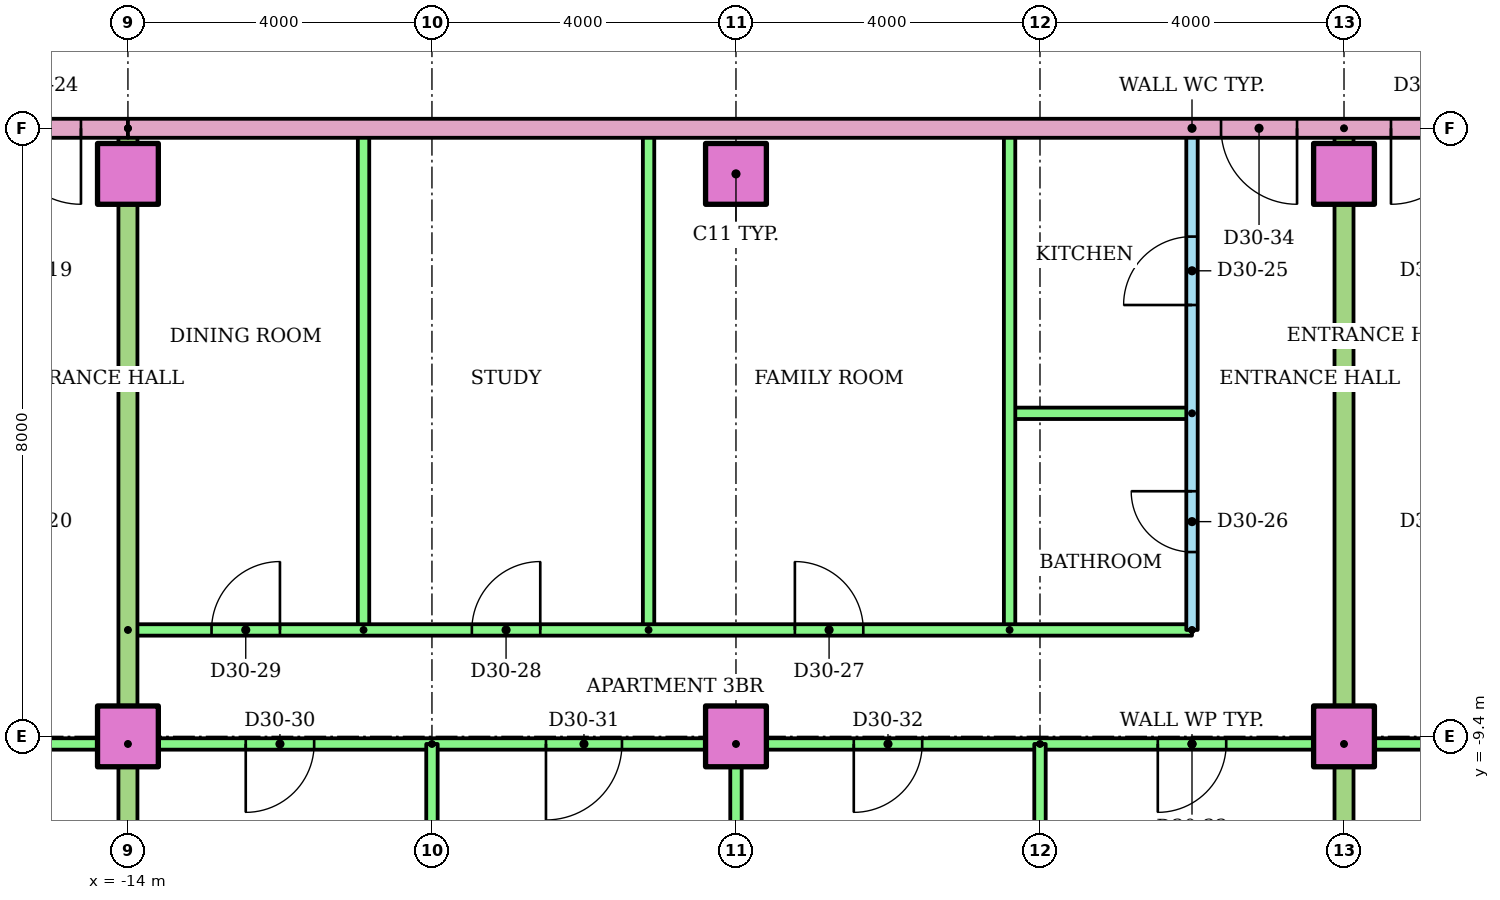
"""IFC4 building model, lengths in metres.
Left out: names, types, materials, properties, quantities, classifications, styles, units other than length and angle.
Written with IfcOpenShell. Run it as: python <this file> out.ifc"""

import sys

from ifc_helpers import new_model, si_unit, direction, frame, frame_2d, origin, origin_2d, place, context, subcontext, project, spatial, rectangle, extrude, element, fill, save


model = new_model("IFC4")
c1 = context("Model", 3, precision=1e-05, world=origin(), true_north=direction((0.0, 1.0)))
c2 = subcontext(c1, "Body", "Model", "MODEL_VIEW")
j1 = project(units=[si_unit("LENGTHUNIT", "METRE"), si_unit("PLANEANGLEUNIT", "RADIAN")], contexts=[c1])
p1 = place(None, origin())
s1 = spatial("IfcSite", under=j1, at=p1, CompositionType="ELEMENT")
p2 = place(p1, origin())
s2 = spatial("IfcBuilding", under=s1, at=p2, CompositionType="ELEMENT")
p3 = place(p2, frame((0.0, 0.0, 119.8)))
s3 = spatial("IfcBuildingStorey", under=s2, at=p3, CompositionType="ELEMENT", Elevation=119.8)
for number, where in (
    (1, (-14.0, -9.4, 0.0)),
    (2, (-6.0, -9.4, 0.0)),
    (3, (2.0, -9.4, 0.0)),
    (4, (-14.0, -2.0, 0.0)),
    (5, (-6.0, -2.0, 0.0)),
    (6, (2.0, -2.0, 0.0)),
):
    element("IfcColumn", number, at=place(p3, frame(where)), inside=s3, PredefinedType="COLUMN", context=c2, shape_type="SweptSolid", body=[
        extrude(rectangle(XDim=0.8, YDim=0.8, at=origin_2d()), origin(), (0.0, 0.0, 1.0), 3.2),
    ])
p4 = place(p3, frame((-14.0, -9.5, 0.0), z_axis=(0.0, 0.0, 1.0), x_axis=(-1.0, 0.0, 0.0)))
e7 = element("IfcWall", 7, at=p4, inside=s3, PredefinedType="PARTITIONING", context=c2, shape_type="SweptSolid", body=[
    extrude(rectangle(XDim=8.0, YDim=0.15, at=frame_2d((4.0, 0.0))), origin(), (0.0, 0.0, 1.0), 2.4),
])
p5 = place(p4, frame((5.5, 0.0, 0.0)))
e8 = element("IfcOpeningElement", 8, at=p5, cuts=e7, PredefinedType="OPENING", context=c2, shape_type="SweptSolid", body=[
    extrude(rectangle(XDim=1.0, YDim=2.1, at=frame_2d((0.5, 1.05))), frame((0.0, 0.085, 0.0), z_axis=(0.0, -1.0, 0.0), x_axis=(1.0, 0.0, 0.0)), (0.0, 0.0, 1.0), 0.17),
])
p6 = place(p4, frame((1.5, 0.0, 0.0)))
e9 = element("IfcOpeningElement", 9, at=p6, cuts=e7, PredefinedType="OPENING", context=c2, shape_type="SweptSolid", body=[
    extrude(rectangle(XDim=1.0, YDim=2.1, at=frame_2d((0.5, 1.05))), frame((0.0, 0.085, 0.0), z_axis=(0.0, -1.0, 0.0), x_axis=(1.0, 0.0, 0.0)), (0.0, 0.0, 1.0), 0.17),
])
p7 = place(p3, frame((0.0, -8.0, 0.0), z_axis=(0.0, 0.0, 1.0), x_axis=(0.0, 1.0, 0.0)))
e10 = element("IfcWall", 10, at=p7, inside=s3, PredefinedType="PARTITIONING", context=c2, shape_type="SweptSolid", body=[
    extrude(rectangle(XDim=6.6, YDim=0.15, at=frame_2d((3.3, 0.0))), origin(), (0.0, 0.0, 1.0), 2.4),
])
p8 = place(p7, frame((4.275, 0.0, 0.0)))
e11 = element("IfcOpeningElement", 11, at=p8, cuts=e10, PredefinedType="OPENING", context=c2, shape_type="SweptSolid", body=[
    extrude(rectangle(XDim=0.9, YDim=2.1, at=frame_2d((0.45, 1.05))), frame((0.0, 0.085, 0.0), z_axis=(0.0, -1.0, 0.0), x_axis=(1.0, 0.0, 0.0)), (0.0, 0.0, 1.0), 0.17),
])
p9 = place(p7, frame((1.025, 0.0, 0.0)))
e12 = element("IfcOpeningElement", 12, at=p9, cuts=e10, PredefinedType="OPENING", context=c2, shape_type="SweptSolid", body=[
    extrude(rectangle(XDim=0.8, YDim=2.1, at=frame_2d((0.4, 1.05))), frame((0.0, 0.085, 0.0), z_axis=(0.0, -1.0, 0.0), x_axis=(1.0, 0.0, 0.0)), (0.0, 0.0, 1.0), 0.17),
])
p10 = place(p3, frame((0.0, -5.15, 0.0), z_axis=(0.0, 0.0, 1.0), x_axis=(-1.0, 0.0, 0.0)))
e13 = element("IfcWall", 13, at=p10, inside=s3, PredefinedType="PARTITIONING", context=c2, shape_type="SweptSolid", body=[
    extrude(rectangle(XDim=2.4, YDim=0.15, at=frame_2d((1.2, 0.0))), origin(), (0.0, 0.0, 1.0), 2.4),
])
for number, where, z_axis, x_axis in (
    (14, (-2.4, -8.0, 0.0), (0.0, 0.0, 1.0), (0.0, 1.0, 0.0)),
    (15, (-7.15, -8.0, 0.0), (0.0, 0.0, 1.0), (0.0, 1.0, 0.0)),
    (16, (-10.9, -8.0, 0.0), (0.0, 0.0, 1.0), (0.0, 1.0, 0.0)),
):
    element("IfcWall", number, at=place(p3, frame(where, z_axis=z_axis, x_axis=x_axis)), inside=s3, PredefinedType="PARTITIONING", context=c2, shape_type="SweptSolid", body=[
        extrude(rectangle(XDim=6.6, YDim=0.15, at=frame_2d((3.3, 0.0))), origin(), (0.0, 0.0, 1.0), 2.4),
    ])
p11 = place(p3, frame((-14.0, -8.0, 0.0)))
e17 = element("IfcWall", 17, at=p11, inside=s3, PredefinedType="PARTITIONING", context=c2, shape_type="SweptSolid", body=[
    extrude(rectangle(XDim=14.0, YDim=0.15, at=frame_2d((7.0, 0.0))), origin(), (0.0, 0.0, 1.0), 2.4),
])
p12 = place(p11, frame((8.775, 0.0, 0.0)))
e18 = element("IfcOpeningElement", 18, at=p12, cuts=e17, PredefinedType="OPENING", context=c2, shape_type="SweptSolid", body=[
    extrude(rectangle(XDim=0.9, YDim=2.1, at=frame_2d((0.45, 1.05))), frame((0.0, 0.085, 0.0), z_axis=(0.0, -1.0, 0.0), x_axis=(1.0, 0.0, 0.0)), (0.0, 0.0, 1.0), 0.17),
])
p13 = place(p11, frame((4.525, 0.0, 0.0)))
e19 = element("IfcOpeningElement", 19, at=p13, cuts=e17, PredefinedType="OPENING", context=c2, shape_type="SweptSolid", body=[
    extrude(rectangle(XDim=0.9, YDim=2.1, at=frame_2d((0.45, 1.05))), frame((0.0, 0.085, 0.0), z_axis=(0.0, -1.0, 0.0), x_axis=(1.0, 0.0, 0.0)), (0.0, 0.0, 1.0), 0.17),
])
p14 = place(p11, frame((1.1, 0.0, 0.0)))
e20 = element("IfcOpeningElement", 20, at=p14, cuts=e17, PredefinedType="OPENING", context=c2, shape_type="SweptSolid", body=[
    extrude(rectangle(XDim=0.9, YDim=2.1, at=frame_2d((0.45, 1.05))), frame((0.0, 0.085, 0.0), z_axis=(0.0, -1.0, 0.0), x_axis=(1.0, 0.0, 0.0)), (0.0, 0.0, 1.0), 0.17),
])
p15 = place(p3, frame((2.0, -9.5, 0.0), z_axis=(0.0, 0.0, 1.0), x_axis=(-1.0, 0.0, 0.0)))
e21 = element("IfcWall", 21, at=p15, inside=s3, PredefinedType="PARTITIONING", context=c2, shape_type="SweptSolid", body=[
    extrude(rectangle(XDim=16.0, YDim=0.15, at=frame_2d((8.0, 0.0))), origin(), (0.0, 0.0, 1.0), 2.4),
])
p16 = place(p15, frame((13.55, 0.0, 0.0)))
e22 = element("IfcOpeningElement", 22, at=p16, cuts=e21, PredefinedType="OPENING", context=c2, shape_type="SweptSolid", body=[
    extrude(rectangle(XDim=0.9, YDim=2.1, at=frame_2d((0.45, 1.05))), frame((0.0, 0.085, 0.0), z_axis=(0.0, -1.0, 0.0), x_axis=(1.0, 0.0, 0.0)), (0.0, 0.0, 1.0), 0.17),
])
p17 = place(p15, frame((9.5, 0.0, 0.0)))
e23 = element("IfcOpeningElement", 23, at=p17, cuts=e21, PredefinedType="OPENING", context=c2, shape_type="SweptSolid", body=[
    extrude(rectangle(XDim=1.0, YDim=2.1, at=frame_2d((0.5, 1.05))), frame((0.0, 0.085, 0.0), z_axis=(0.0, -1.0, 0.0), x_axis=(1.0, 0.0, 0.0)), (0.0, 0.0, 1.0), 0.17),
])
p18 = place(p15, frame((5.55, 0.0, 0.0)))
e24 = element("IfcOpeningElement", 24, at=p18, cuts=e21, PredefinedType="OPENING", context=c2, shape_type="SweptSolid", body=[
    extrude(rectangle(XDim=0.9, YDim=2.1, at=frame_2d((0.45, 1.05))), frame((0.0, 0.085, 0.0), z_axis=(0.0, -1.0, 0.0), x_axis=(1.0, 0.0, 0.0)), (0.0, 0.0, 1.0), 0.17),
])
p19 = place(p15, frame((1.55, 0.0, 0.0)))
e25 = element("IfcOpeningElement", 25, at=p19, cuts=e21, PredefinedType="OPENING", context=c2, shape_type="SweptSolid", body=[
    extrude(rectangle(XDim=0.9, YDim=2.1, at=frame_2d((0.45, 1.05))), frame((0.0, 0.085, 0.0), z_axis=(0.0, -1.0, 0.0), x_axis=(1.0, 0.0, 0.0)), (0.0, 0.0, 1.0), 0.17),
])
p20 = place(p3, frame((-10.0, -9.5, 0.0), z_axis=(0.0, 0.0, 1.0), x_axis=(0.0, -1.0, 0.0)))
e26 = element("IfcWall", 26, at=p20, inside=s3, PredefinedType="PARTITIONING", context=c2, shape_type="SweptSolid", body=[
    extrude(rectangle(XDim=6.821, YDim=0.15, at=frame_2d((3.411, 0.0))), origin(), (0.0, 0.0, 1.0), 2.4),
])
p21 = place(p3, frame((-6.0, -9.5, 0.0), z_axis=(0.0, 0.0, 1.0), x_axis=(0.0, -1.0, 0.0)))
e27 = element("IfcWall", 27, at=p21, inside=s3, PredefinedType="PARTITIONING", context=c2, shape_type="SweptSolid", body=[
    extrude(rectangle(XDim=6.81, YDim=0.15, at=frame_2d((3.405, 0.0))), origin(), (0.0, 0.0, 1.0), 2.4),
])
p22 = place(p3, frame((-2.0, -9.5, 0.0), z_axis=(0.0, 0.0, 1.0), x_axis=(0.0, -1.0, 0.0)))
e28 = element("IfcWall", 28, at=p22, inside=s3, PredefinedType="PARTITIONING", context=c2, shape_type="SweptSolid", body=[
    extrude(rectangle(XDim=6.821, YDim=0.15, at=frame_2d((3.411, 0.0))), origin(), (0.0, 0.0, 1.0), 2.4),
])
p23 = place(p3, frame((-14.0, -1.4, 0.0), z_axis=(0.0, 0.0, 1.0), x_axis=(0.0, -1.0, 0.0)))
e29 = element("IfcWall", 29, at=p23, inside=s3, PredefinedType="PARTITIONING", context=c2, shape_type="SweptSolid", body=[
    extrude(rectangle(XDim=14.91, YDim=0.25, at=frame_2d((7.455, 0.0))), origin(), (0.0, 0.0, 1.0), 2.4),
])
p24 = place(p3, frame((18.0, -9.5, 0.0), z_axis=(0.0, 0.0, 1.0), x_axis=(-1.0, 0.0, 0.0)))
e30 = element("IfcWall", 30, at=p24, inside=s3, PredefinedType="PARTITIONING", context=c2, shape_type="SweptSolid", body=[
    extrude(rectangle(XDim=16.0, YDim=0.15, at=frame_2d((8.0, 0.0))), origin(), (0.0, 0.0, 1.0), 2.4),
])
p25 = place(p24, frame((13.55, 0.0, 0.0)))
e31 = element("IfcOpeningElement", 31, at=p25, cuts=e30, PredefinedType="OPENING", context=c2, shape_type="SweptSolid", body=[
    extrude(rectangle(XDim=0.9, YDim=2.1, at=frame_2d((0.45, 1.05))), frame((0.0, 0.085, 0.0), z_axis=(0.0, -1.0, 0.0), x_axis=(1.0, 0.0, 0.0)), (0.0, 0.0, 1.0), 0.17),
])
p26 = place(p24, frame((9.55, 0.0, 0.0)))
e32 = element("IfcOpeningElement", 32, at=p26, cuts=e30, PredefinedType="OPENING", context=c2, shape_type="SweptSolid", body=[
    extrude(rectangle(XDim=0.9, YDim=2.1, at=frame_2d((0.45, 1.05))), frame((0.0, 0.085, 0.0), z_axis=(0.0, -1.0, 0.0), x_axis=(1.0, 0.0, 0.0)), (0.0, 0.0, 1.0), 0.17),
])
p27 = place(p24, frame((5.55, 0.0, 0.0)))
e33 = element("IfcOpeningElement", 33, at=p27, cuts=e30, PredefinedType="OPENING", context=c2, shape_type="SweptSolid", body=[
    extrude(rectangle(XDim=0.9, YDim=2.1, at=frame_2d((0.45, 1.05))), frame((0.0, 0.085, 0.0), z_axis=(0.0, -1.0, 0.0), x_axis=(1.0, 0.0, 0.0)), (0.0, 0.0, 1.0), 0.17),
])
p28 = place(p24, frame((1.5, 0.0, 0.0)))
e34 = element("IfcOpeningElement", 34, at=p28, cuts=e30, PredefinedType="OPENING", context=c2, shape_type="SweptSolid", body=[
    extrude(rectangle(XDim=1.0, YDim=2.1, at=frame_2d((0.5, 1.05))), frame((0.0, 0.085, 0.0), z_axis=(0.0, -1.0, 0.0), x_axis=(1.0, 0.0, 0.0)), (0.0, 0.0, 1.0), 0.17),
])
p29 = place(p3, frame((2.0, -1.4, 0.0), z_axis=(0.0, 0.0, 1.0), x_axis=(0.0, -1.0, 0.0)))
e35 = element("IfcWall", 35, at=p29, inside=s3, PredefinedType="PARTITIONING", context=c2, shape_type="SweptSolid", body=[
    extrude(rectangle(XDim=14.91, YDim=0.25, at=frame_2d((7.455, 0.0))), origin(), (0.0, 0.0, 1.0), 2.4),
])
p30 = place(p3, frame((-14.0, -1.4, 0.0), z_axis=(0.0, 0.0, 1.0), x_axis=(-1.0, 0.0, 0.0)))
e36 = element("IfcWall", 36, at=p30, inside=s3, PredefinedType="PARTITIONING", context=c2, shape_type="SweptSolid", body=[
    extrude(rectangle(XDim=15.0, YDim=0.25, at=frame_2d((7.5, 0.0))), origin(), (0.0, 0.0, 1.0), 2.4),
])
p31 = place(p30, frame((8.618, 0.0, 0.0)))
e37 = element("IfcOpeningElement", 37, at=p31, cuts=e36, PredefinedType="OPENING", context=c2, shape_type="SweptSolid", body=[
    extrude(rectangle(XDim=1.0, YDim=2.1, at=frame_2d((0.5, 1.05))), frame((0.0, 0.135, 0.0), z_axis=(0.0, -1.0, 0.0), x_axis=(1.0, 0.0, 0.0)), (0.0, 0.0, 1.0), 0.27),
])
p32 = place(p30, frame((0.618, 0.0, 0.0)))
e38 = element("IfcOpeningElement", 38, at=p32, cuts=e36, PredefinedType="OPENING", context=c2, shape_type="SweptSolid", body=[
    extrude(rectangle(XDim=1.0, YDim=2.1, at=frame_2d((0.5, 1.05))), frame((0.0, 0.135, 0.0), z_axis=(0.0, -1.0, 0.0), x_axis=(1.0, 0.0, 0.0)), (0.0, 0.0, 1.0), 0.27),
])
p33 = place(p3, frame((14.0, -1.4, 0.0), z_axis=(0.0, 0.0, 1.0), x_axis=(-1.0, 0.0, 0.0)))
e39 = element("IfcWall", 39, at=p33, inside=s3, PredefinedType="PARTITIONING", context=c2, shape_type="SweptSolid", body=[
    extrude(rectangle(XDim=28.0, YDim=0.25, at=frame_2d((14.0, 0.0))), origin(), (0.0, 0.0, 1.0), 2.4),
])
p34 = place(p33, frame((12.618, 0.0, 0.0)))
e40 = element("IfcOpeningElement", 40, at=p34, cuts=e39, PredefinedType="OPENING", context=c2, shape_type="SweptSolid", body=[
    extrude(rectangle(XDim=1.0, YDim=2.1, at=frame_2d((0.5, 1.05))), frame((0.0, 0.135, 0.0), z_axis=(0.0, -1.0, 0.0), x_axis=(1.0, 0.0, 0.0)), (0.0, 0.0, 1.0), 0.27),
])
p35 = place(p33, frame((10.382, 0.0, 0.0)))
e41 = element("IfcOpeningElement", 41, at=p35, cuts=e39, PredefinedType="OPENING", context=c2, shape_type="SweptSolid", body=[
    extrude(rectangle(XDim=1.0, YDim=2.1, at=frame_2d((0.5, 1.05))), frame((0.0, 0.135, 0.0), z_axis=(0.0, -1.0, 0.0), x_axis=(1.0, 0.0, 0.0)), (0.0, 0.0, 1.0), 0.27),
])
p36 = place(p32, origin())
e42 = element("IfcDoor", 42, at=p36, inside=s3, OperationType="SINGLE_SWING_LEFT", PredefinedType="DOOR", context=c2, shape_type="SweptSolid", body=[
    extrude(rectangle(XDim=1.0, YDim=2.1, at=frame_2d((0.5, 1.05))), frame((0.0, 0.025, 0.0), z_axis=(0.0, -1.0, 0.0), x_axis=(1.0, 0.0, 0.0)), (0.0, 0.0, 1.0), 0.05),
])
fill(e38, e42)
p37 = place(p8, origin())
e43 = element("IfcDoor", 43, at=p37, inside=s3, OperationType="SINGLE_SWING_LEFT", PredefinedType="DOOR", context=c2, shape_type="SweptSolid", body=[
    extrude(rectangle(XDim=0.9, YDim=2.1, at=frame_2d((0.45, 1.05))), frame((0.0, 0.025, 0.0), z_axis=(0.0, -1.0, 0.0), x_axis=(1.0, 0.0, 0.0)), (0.0, 0.0, 1.0), 0.05),
])
fill(e11, e43)
p38 = place(p9, origin())
e44 = element("IfcDoor", 44, at=p38, inside=s3, OperationType="SINGLE_SWING_RIGHT", PredefinedType="DOOR", context=c2, shape_type="SweptSolid", body=[
    extrude(rectangle(XDim=0.8, YDim=2.1, at=frame_2d((0.4, 1.05))), frame((0.0, 0.025, 0.0), z_axis=(0.0, -1.0, 0.0), x_axis=(1.0, 0.0, 0.0)), (0.0, 0.0, 1.0), 0.05),
])
fill(e12, e44)
p39 = place(p12, origin())
e45 = element("IfcDoor", 45, at=p39, inside=s3, OperationType="SINGLE_SWING_LEFT", PredefinedType="DOOR", context=c2, shape_type="SweptSolid", body=[
    extrude(rectangle(XDim=0.9, YDim=2.1, at=frame_2d((0.45, 1.05))), frame((0.0, 0.025, 0.0), z_axis=(0.0, -1.0, 0.0), x_axis=(1.0, 0.0, 0.0)), (0.0, 0.0, 1.0), 0.05),
])
fill(e18, e45)
p40 = place(p13, origin())
e46 = element("IfcDoor", 46, at=p40, inside=s3, OperationType="SINGLE_SWING_RIGHT", PredefinedType="DOOR", context=c2, shape_type="SweptSolid", body=[
    extrude(rectangle(XDim=0.9, YDim=2.1, at=frame_2d((0.45, 1.05))), frame((0.0, 0.025, 0.0), z_axis=(0.0, -1.0, 0.0), x_axis=(1.0, 0.0, 0.0)), (0.0, 0.0, 1.0), 0.05),
])
fill(e19, e46)
p41 = place(p14, origin())
e47 = element("IfcDoor", 47, at=p41, inside=s3, OperationType="SINGLE_SWING_RIGHT", PredefinedType="DOOR", context=c2, shape_type="SweptSolid", body=[
    extrude(rectangle(XDim=0.9, YDim=2.1, at=frame_2d((0.45, 1.05))), frame((0.0, 0.025, 0.0), z_axis=(0.0, -1.0, 0.0), x_axis=(1.0, 0.0, 0.0)), (0.0, 0.0, 1.0), 0.05),
])
fill(e20, e47)
p42 = place(p16, origin())
e48 = element("IfcDoor", 48, at=p42, inside=s3, OperationType="SINGLE_SWING_RIGHT", PredefinedType="DOOR", context=c2, shape_type="SweptSolid", body=[
    extrude(rectangle(XDim=0.9, YDim=2.1, at=frame_2d((0.45, 1.05))), frame((0.0, 0.025, 0.0), z_axis=(0.0, -1.0, 0.0), x_axis=(1.0, 0.0, 0.0)), (0.0, 0.0, 1.0), 0.05),
])
fill(e22, e48)
p43 = place(p17, origin())
e49 = element("IfcDoor", 49, at=p43, inside=s3, OperationType="SINGLE_SWING_RIGHT", PredefinedType="DOOR", context=c2, shape_type="SweptSolid", body=[
    extrude(rectangle(XDim=1.0, YDim=2.1, at=frame_2d((0.5, 1.05))), frame((0.0, 0.025, 0.0), z_axis=(0.0, -1.0, 0.0), x_axis=(1.0, 0.0, 0.0)), (0.0, 0.0, 1.0), 0.05),
])
fill(e23, e49)
p44 = place(p18, origin())
e50 = element("IfcDoor", 50, at=p44, inside=s3, OperationType="SINGLE_SWING_RIGHT", PredefinedType="DOOR", context=c2, shape_type="SweptSolid", body=[
    extrude(rectangle(XDim=0.9, YDim=2.1, at=frame_2d((0.45, 1.05))), frame((0.0, 0.025, 0.0), z_axis=(0.0, -1.0, 0.0), x_axis=(1.0, 0.0, 0.0)), (0.0, 0.0, 1.0), 0.05),
])
fill(e24, e50)
p45 = place(p19, origin())
e51 = element("IfcDoor", 51, at=p45, inside=s3, OperationType="SINGLE_SWING_RIGHT", PredefinedType="DOOR", context=c2, shape_type="SweptSolid", body=[
    extrude(rectangle(XDim=0.9, YDim=2.1, at=frame_2d((0.45, 1.05))), frame((0.0, 0.025, 0.0), z_axis=(0.0, -1.0, 0.0), x_axis=(1.0, 0.0, 0.0)), (0.0, 0.0, 1.0), 0.05),
])
fill(e25, e51)
p46 = place(p34, origin())
e52 = element("IfcDoor", 52, at=p46, inside=s3, OperationType="SINGLE_SWING_LEFT", PredefinedType="DOOR", context=c2, shape_type="SweptSolid", body=[
    extrude(rectangle(XDim=1.0, YDim=2.1, at=frame_2d((0.5, 1.05))), frame((0.0, 0.025, 0.0), z_axis=(0.0, -1.0, 0.0), x_axis=(1.0, 0.0, 0.0)), (0.0, 0.0, 1.0), 0.05),
])
fill(e40, e52)
p47 = place(p35, origin())
e53 = element("IfcDoor", 53, at=p47, inside=s3, OperationType="SINGLE_SWING_RIGHT", PredefinedType="DOOR", context=c2, shape_type="SweptSolid", body=[
    extrude(rectangle(XDim=1.0, YDim=2.1, at=frame_2d((0.5, 1.05))), frame((0.0, 0.025, 0.0), z_axis=(0.0, -1.0, 0.0), x_axis=(1.0, 0.0, 0.0)), (0.0, 0.0, 1.0), 0.05),
])
fill(e41, e53)
save(model, sys.argv[1])
